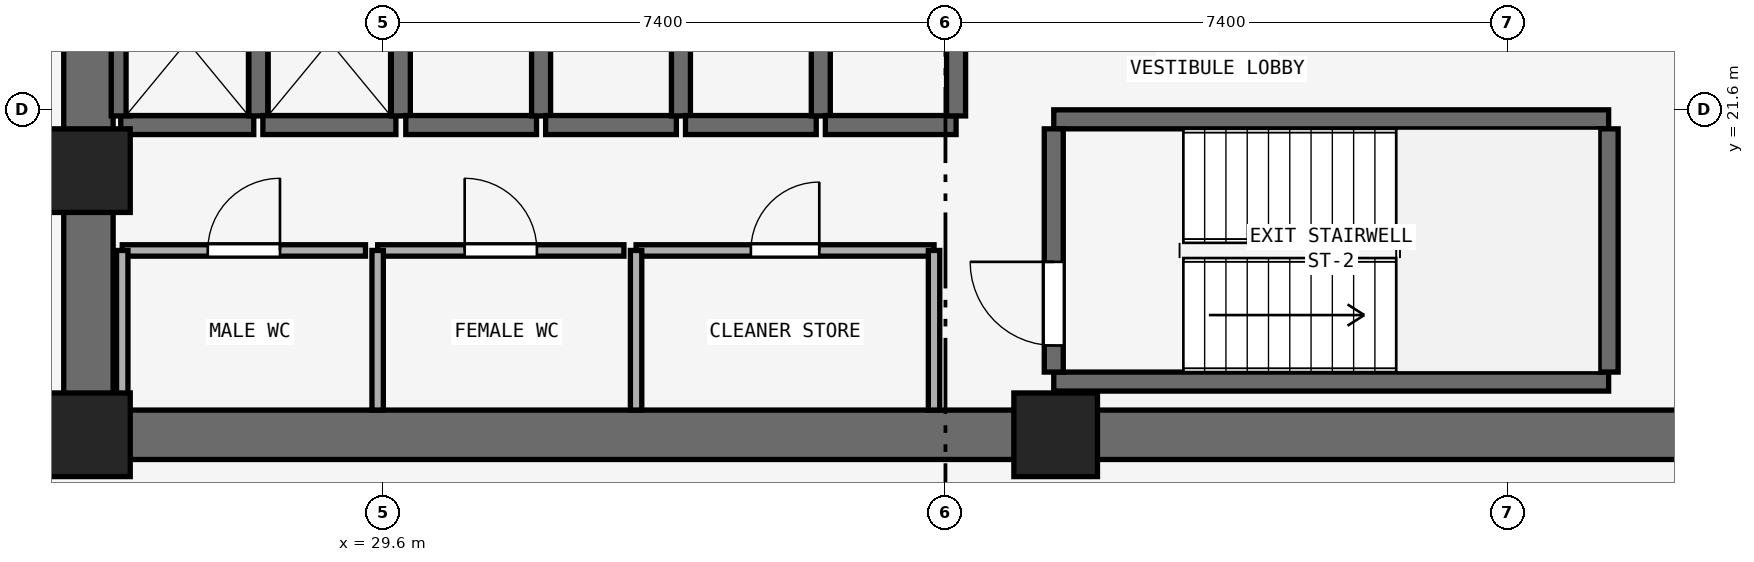
"""IFC4 building model, lengths in metres.
Left out: names, types, materials, properties, quantities, classifications, styles, units other than length and angle.
Written with IfcOpenShell. Run it as: python <this file> out.ifc"""

import sys

from ifc_helpers import new_model, si_unit, direction, frame, frame_2d, origin, origin_2d, place, context, subcontext, project, spatial, rectangle, extrude, element, fill, save


model = new_model("IFC4")
c1 = context("Model", 3, precision=1e-05, world=origin(), true_north=direction((0.0, 1.0)))
c2 = subcontext(c1, "Body", "Model", "MODEL_VIEW")
j1 = project(units=[si_unit("LENGTHUNIT", "METRE"), si_unit("PLANEANGLEUNIT", "RADIAN")], contexts=[c1])
p1 = place(None, origin())
s1 = spatial("IfcSite", under=j1, at=p1, CompositionType="ELEMENT")
p2 = place(p1, origin())
s2 = spatial("IfcBuilding", under=s1, at=p2, CompositionType="ELEMENT")
p3 = place(p2, frame((0.0, 0.0, 25.0)))
s3 = spatial("IfcBuildingStorey", under=s2, at=p3, CompositionType="ELEMENT", Elevation=25.0)
p4 = place(p3, frame((25.4, 17.325, 0.0), z_axis=(0.0, 0.0, 1.0), x_axis=(1.0, 0.0, 0.0)))
e1 = element("IfcWall", 1, at=p4, inside=s3, PredefinedType="SHEAR", context=c2, shape_type="SweptSolid", body=[
    extrude(rectangle(XDim=23.2, YDim=0.65, at=frame_2d((11.6, 0.0))), origin(), (0.0, 0.0, 1.0), 3.525),
])
p5 = place(p3, frame((25.725, 17.65, 0.0), z_axis=(0.0, 0.0, 1.0), x_axis=(0.0, 1.0, 0.0)))
e2 = element("IfcWall", 2, at=p5, inside=s3, PredefinedType="SHEAR", context=c2, shape_type="SweptSolid", body=[
    extrude(rectangle(XDim=15.1, YDim=0.65, at=frame_2d((7.55, 0.0))), origin(), (0.0, 0.0, 1.0), 3.525),
])
p6 = place(p5, frame((6.8, 0.0, 0.0)))
e3 = element("IfcOpeningElement", 3, at=p6, cuts=e2, PredefinedType="OPENING", context=c2, shape_type="SweptSolid", body=[
    extrude(rectangle(XDim=1.5, YDim=2.15, at=frame_2d((0.75, 1.075))), frame((0.0, 0.335, 0.0), z_axis=(0.0, -1.0, 0.0), x_axis=(1.0, 0.0, 0.0)), (0.0, 0.0, 1.0), 0.67),
])
for number, where, z_axis, x_axis in (
    (4, (25.725, 17.325, 0.0), (0.0, 0.0, 1.0), (1.0, 0.0, 0.0)),
    (5, (38.45, 17.325, 0.0), (0.0, 0.0, 1.0), (1.0, 0.0, 0.0)),
    (6, (25.725, 20.8, 0.0), (0.0, 0.0, 1.0), (1.0, 0.0, 0.0)),
):
    element("IfcColumn", number, at=place(p3, frame(where, z_axis=z_axis, x_axis=x_axis)), inside=s3, PredefinedType="PILASTER", context=c2, shape_type="SweptSolid", body=[
        extrude(rectangle(XDim=1.1, YDim=1.1, at=origin_2d()), origin(), (0.0, 0.0, 1.0), 3.8),
    ])
for number, where, z_axis, x_axis in (
    (7, (38.425, 18.025, 0.0), (0.0, 0.0, 1.0), (1.0, 0.0, 0.0)),
    (8, (38.425, 21.475, 0.0), (0.0, 0.0, 1.0), (1.0, 0.0, 0.0)),
):
    element("IfcWall", number, at=place(p3, frame(where, z_axis=z_axis, x_axis=x_axis)), inside=s3, PredefinedType="SHEAR", context=c2, shape_type="SweptSolid", body=[
        extrude(rectangle(XDim=7.3, YDim=0.25, at=frame_2d((3.65, 0.0))), origin(), (0.0, 0.0, 1.0), 3.525),
    ])
p7 = place(p3, frame((38.425, 18.15, 0.0), z_axis=(0.0, 0.0, 1.0), x_axis=(0.0, 1.0, 0.0)))
e9 = element("IfcWall", 9, at=p7, inside=s3, PredefinedType="SHEAR", context=c2, shape_type="SweptSolid", body=[
    extrude(rectangle(XDim=3.2, YDim=0.25, at=frame_2d((1.6, 0.0))), origin(), (0.0, 0.0, 1.0), 3.525),
])
p8 = place(p7, frame((0.35, 0.0, 0.0)))
e10 = element("IfcOpeningElement", 10, at=p8, cuts=e9, PredefinedType="OPENING", context=c2, shape_type="SweptSolid", body=[
    extrude(rectangle(XDim=1.1, YDim=2.15, at=frame_2d((0.55, 1.075))), frame((0.0, 0.135, 0.0), z_axis=(0.0, -1.0, 0.0), x_axis=(1.0, 0.0, 0.0)), (0.0, 0.0, 1.0), 0.27),
])
p9 = place(p3, frame((45.725, 18.15, 0.0), z_axis=(0.0, 0.0, 1.0), x_axis=(0.0, 1.0, 0.0)))
e11 = element("IfcWall", 11, at=p9, inside=s3, PredefinedType="SHEAR", context=c2, shape_type="SweptSolid", body=[
    extrude(rectangle(XDim=3.2, YDim=0.25, at=frame_2d((1.6, 0.0))), origin(), (0.0, 0.0, 1.0), 3.525),
])
p10 = place(p3, frame((26.15, 21.4, 0.0), z_axis=(0.0, 0.0, 1.0), x_axis=(1.0, 0.0, 0.0)))
e12 = element("IfcWall", 12, at=p10, inside=s3, PredefinedType="SHEAR", context=c2, shape_type="SweptSolid", body=[
    extrude(rectangle(XDim=1.75, YDim=0.25, at=frame_2d((0.875, 0.0))), origin(), (0.0, 0.0, 1.0), 3.525),
])
for number, where, z_axis, x_axis in (
    (13, (26.15, 21.52, 0.0), (0.0, 0.0, 1.0), (0.0, 1.0, 0.0)),
    (14, (27.96, 21.52, 0.0), (0.0, 0.0, 1.0), (0.0, 1.0, 0.0)),
):
    element("IfcWall", number, at=place(p3, frame(where, z_axis=z_axis, x_axis=x_axis)), inside=s3, PredefinedType="SHEAR", context=c2, shape_type="SweptSolid", body=[
        extrude(rectangle(XDim=1.96, YDim=0.25, at=frame_2d((0.98, 0.0))), origin(), (0.0, 0.0, 1.0), 3.525),
    ])
p11 = place(p3, frame((28.02, 21.4, 0.0), z_axis=(0.0, 0.0, 1.0), x_axis=(1.0, 0.0, 0.0)))
e15 = element("IfcWall", 15, at=p11, inside=s3, PredefinedType="SHEAR", context=c2, shape_type="SweptSolid", body=[
    extrude(rectangle(XDim=1.75, YDim=0.25, at=frame_2d((0.875, 0.0))), origin(), (0.0, 0.0, 1.0), 3.525),
])
p12 = place(p3, frame((29.835, 21.52, 0.0), z_axis=(0.0, 0.0, 1.0), x_axis=(0.0, 1.0, 0.0)))
e16 = element("IfcWall", 16, at=p12, inside=s3, PredefinedType="SHEAR", context=c2, shape_type="SweptSolid", body=[
    extrude(rectangle(XDim=1.96, YDim=0.25, at=frame_2d((0.98, 0.0))), origin(), (0.0, 0.0, 1.0), 3.525),
])
p13 = place(p3, frame((29.9, 21.4, 0.0), z_axis=(0.0, 0.0, 1.0), x_axis=(1.0, 0.0, 0.0)))
e17 = element("IfcWall", 17, at=p13, inside=s3, PredefinedType="SHEAR", context=c2, shape_type="SweptSolid", body=[
    extrude(rectangle(XDim=1.72, YDim=0.25, at=frame_2d((0.86, 0.0))), origin(), (0.0, 0.0, 1.0), 3.525),
])
p14 = place(p3, frame((31.68, 21.52, 0.0), z_axis=(0.0, 0.0, 1.0), x_axis=(0.0, 1.0, 0.0)))
e18 = element("IfcWall", 18, at=p14, inside=s3, PredefinedType="SHEAR", context=c2, shape_type="SweptSolid", body=[
    extrude(rectangle(XDim=1.96, YDim=0.25, at=frame_2d((0.98, 0.0))), origin(), (0.0, 0.0, 1.0), 3.525),
])
p15 = place(p3, frame((31.74, 21.4, 0.0), z_axis=(0.0, 0.0, 1.0), x_axis=(1.0, 0.0, 0.0)))
e19 = element("IfcWall", 19, at=p15, inside=s3, PredefinedType="SHEAR", context=c2, shape_type="SweptSolid", body=[
    extrude(rectangle(XDim=1.72, YDim=0.25, at=frame_2d((0.86, 0.0))), origin(), (0.0, 0.0, 1.0), 3.525),
])
p16 = place(p3, frame((33.52, 21.52, 0.0), z_axis=(0.0, 0.0, 1.0), x_axis=(0.0, 1.0, 0.0)))
e20 = element("IfcWall", 20, at=p16, inside=s3, PredefinedType="SHEAR", context=c2, shape_type="SweptSolid", body=[
    extrude(rectangle(XDim=1.96, YDim=0.25, at=frame_2d((0.98, 0.0))), origin(), (0.0, 0.0, 1.0), 3.525),
])
p17 = place(p3, frame((33.58, 21.4, 0.0), z_axis=(0.0, 0.0, 1.0), x_axis=(1.0, 0.0, 0.0)))
e21 = element("IfcWall", 21, at=p17, inside=s3, PredefinedType="SHEAR", context=c2, shape_type="SweptSolid", body=[
    extrude(rectangle(XDim=1.72, YDim=0.25, at=frame_2d((0.86, 0.0))), origin(), (0.0, 0.0, 1.0), 3.525),
])
p18 = place(p3, frame((35.36, 21.52, 0.0), z_axis=(0.0, 0.0, 1.0), x_axis=(0.0, 1.0, 0.0)))
e22 = element("IfcWall", 22, at=p18, inside=s3, PredefinedType="SHEAR", context=c2, shape_type="SweptSolid", body=[
    extrude(rectangle(XDim=1.96, YDim=0.25, at=frame_2d((0.98, 0.0))), origin(), (0.0, 0.0, 1.0), 3.525),
])
p19 = place(p3, frame((35.42, 21.4, 0.0), z_axis=(0.0, 0.0, 1.0), x_axis=(1.0, 0.0, 0.0)))
e23 = element("IfcWall", 23, at=p19, inside=s3, PredefinedType="SHEAR", context=c2, shape_type="SweptSolid", body=[
    extrude(rectangle(XDim=1.72, YDim=0.25, at=frame_2d((0.86, 0.0))), origin(), (0.0, 0.0, 1.0), 3.525),
])
p20 = place(p3, frame((37.14, 21.52, 0.0), z_axis=(0.0, 0.0, 1.0), x_axis=(0.0, 1.0, 0.0)))
e24 = element("IfcWall", 24, at=p20, inside=s3, PredefinedType="SHEAR", context=c2, shape_type="SweptSolid", body=[
    extrude(rectangle(XDim=1.96, YDim=0.25, at=frame_2d((0.98, 0.0))), origin(), (0.0, 0.0, 1.0), 3.525),
])
p21 = place(p3, frame((26.17, 19.75, 0.0), z_axis=(0.0, 0.0, 1.0), x_axis=(1.0, 0.0, 0.0)))
e25 = element("IfcWall", 25, at=p21, inside=s3, PredefinedType="PARTITIONING", context=c2, shape_type="SweptSolid", body=[
    extrude(rectangle(XDim=3.2, YDim=0.15, at=frame_2d((1.6, 0.0))), origin(), (0.0, 0.0, 1.0), 3.525),
])
p22 = place(p21, frame((1.125, 0.0, 0.0)))
e26 = element("IfcOpeningElement", 26, at=p22, cuts=e25, PredefinedType="OPENING", context=c2, shape_type="SweptSolid", body=[
    extrude(rectangle(XDim=0.95, YDim=2.1, at=frame_2d((0.475, 1.05))), frame((0.0, 0.085, 0.0), z_axis=(0.0, -1.0, 0.0), x_axis=(1.0, 0.0, 0.0)), (0.0, 0.0, 1.0), 0.17),
])
p23 = place(p3, frame((26.17, 17.65, 0.0), z_axis=(0.0, 0.0, 1.0), x_axis=(0.0, 1.0, 0.0)))
e27 = element("IfcWall", 27, at=p23, inside=s3, PredefinedType="PARTITIONING", context=c2, shape_type="SweptSolid", body=[
    extrude(rectangle(XDim=2.1, YDim=0.15, at=frame_2d((1.05, 0.0))), origin(), (0.0, 0.0, 1.0), 3.525),
])
p24 = place(p3, frame((29.53, 19.75, 0.0), z_axis=(0.0, 0.0, 1.0), x_axis=(1.0, 0.0, 0.0)))
e28 = element("IfcWall", 28, at=p24, inside=s3, PredefinedType="PARTITIONING", context=c2, shape_type="SweptSolid", body=[
    extrude(rectangle(XDim=3.24, YDim=0.15, at=frame_2d((1.62, 0.0))), origin(), (0.0, 0.0, 1.0), 3.525),
])
p25 = place(p24, frame((1.145, 0.0, 0.0)))
e29 = element("IfcOpeningElement", 29, at=p25, cuts=e28, PredefinedType="OPENING", context=c2, shape_type="SweptSolid", body=[
    extrude(rectangle(XDim=0.95, YDim=2.1, at=frame_2d((0.475, 1.05))), frame((0.0, 0.085, 0.0), z_axis=(0.0, -1.0, 0.0), x_axis=(1.0, 0.0, 0.0)), (0.0, 0.0, 1.0), 0.17),
])
p26 = place(p3, frame((29.53, 17.65, 0.0), z_axis=(0.0, 0.0, 1.0), x_axis=(0.0, 1.0, 0.0)))
e30 = element("IfcWall", 30, at=p26, inside=s3, PredefinedType="PARTITIONING", context=c2, shape_type="SweptSolid", body=[
    extrude(rectangle(XDim=2.1, YDim=0.15, at=frame_2d((1.05, 0.0))), origin(), (0.0, 0.0, 1.0), 3.525),
])
p27 = place(p3, frame((32.93, 19.75, 0.0), z_axis=(0.0, 0.0, 1.0), x_axis=(1.0, 0.0, 0.0)))
e31 = element("IfcWall", 31, at=p27, inside=s3, PredefinedType="PARTITIONING", context=c2, shape_type="SweptSolid", body=[
    extrude(rectangle(XDim=3.92, YDim=0.15, at=frame_2d((1.96, 0.0))), origin(), (0.0, 0.0, 1.0), 3.525),
])
p28 = place(p27, frame((1.51, 0.0, 0.0)))
e32 = element("IfcOpeningElement", 32, at=p28, cuts=e31, PredefinedType="OPENING", context=c2, shape_type="SweptSolid", body=[
    extrude(rectangle(XDim=0.9, YDim=2.1, at=frame_2d((0.45, 1.05))), frame((0.0, 0.085, 0.0), z_axis=(0.0, -1.0, 0.0), x_axis=(1.0, 0.0, 0.0)), (0.0, 0.0, 1.0), 0.17),
])
for number, where, z_axis, x_axis in (
    (33, (32.93, 17.65, 0.0), (0.0, 0.0, 1.0), (0.0, 1.0, 0.0)),
    (34, (36.85, 17.65, 0.0), (0.0, 0.0, 1.0), (0.0, 1.0, 0.0)),
):
    element("IfcWall", number, at=place(p3, frame(where, z_axis=z_axis, x_axis=x_axis)), inside=s3, PredefinedType="PARTITIONING", context=c2, shape_type="SweptSolid", body=[
        extrude(rectangle(XDim=2.1, YDim=0.15, at=frame_2d((1.05, 0.0))), origin(), (0.0, 0.0, 1.0), 3.525),
    ])
p29 = place(p8, origin())
e35 = element("IfcDoor", 35, at=p29, inside=s3, OperationType="SINGLE_SWING_RIGHT", PredefinedType="DOOR", context=c2, shape_type="SweptSolid", body=[
    extrude(rectangle(XDim=1.1, YDim=2.15, at=frame_2d((0.55, 1.075))), frame((0.0, 0.025, 0.0), z_axis=(0.0, -1.0, 0.0), x_axis=(1.0, 0.0, 0.0)), (0.0, 0.0, 1.0), 0.05),
])
fill(e10, e35)
p30 = place(p22, origin())
e36 = element("IfcDoor", 36, at=p30, inside=s3, OperationType="SINGLE_SWING_RIGHT", PredefinedType="DOOR", context=c2, shape_type="SweptSolid", body=[
    extrude(rectangle(XDim=0.95, YDim=2.1, at=frame_2d((0.475, 1.05))), frame((0.0, 0.025, 0.0), z_axis=(0.0, -1.0, 0.0), x_axis=(1.0, 0.0, 0.0)), (0.0, 0.0, 1.0), 0.05),
])
fill(e26, e36)
p31 = place(p25, origin())
e37 = element("IfcDoor", 37, at=p31, inside=s3, OperationType="SINGLE_SWING_LEFT", PredefinedType="DOOR", context=c2, shape_type="SweptSolid", body=[
    extrude(rectangle(XDim=0.95, YDim=2.1, at=frame_2d((0.475, 1.05))), frame((0.0, 0.025, 0.0), z_axis=(0.0, -1.0, 0.0), x_axis=(1.0, 0.0, 0.0)), (0.0, 0.0, 1.0), 0.05),
])
fill(e29, e37)
p32 = place(p28, origin())
e38 = element("IfcDoor", 38, at=p32, inside=s3, OperationType="SINGLE_SWING_RIGHT", PredefinedType="DOOR", context=c2, shape_type="SweptSolid", body=[
    extrude(rectangle(XDim=0.9, YDim=2.1, at=frame_2d((0.45, 1.05))), frame((0.0, 0.025, 0.0), z_axis=(0.0, -1.0, 0.0), x_axis=(1.0, 0.0, 0.0)), (0.0, 0.0, 1.0), 0.05),
])
fill(e32, e38)
save(model, sys.argv[1])
